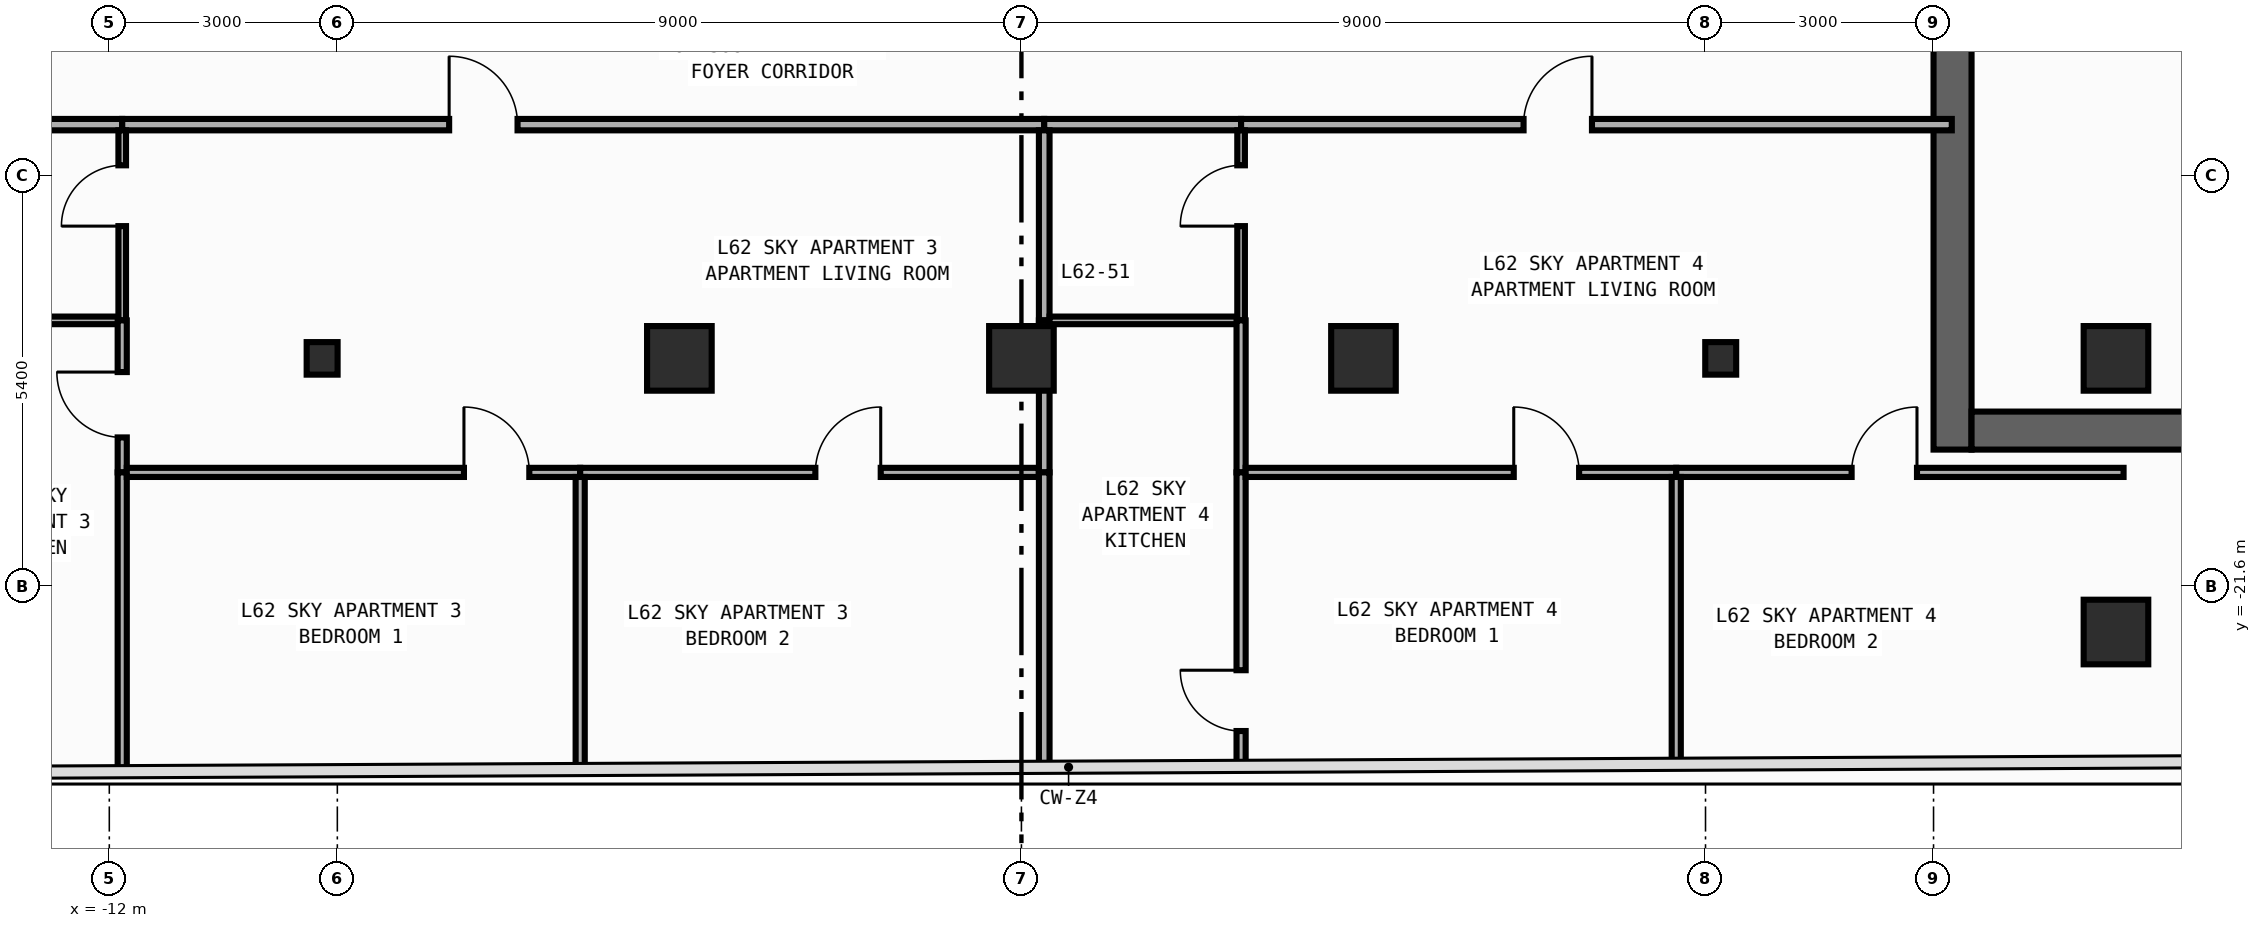
"""IFC4 building model, lengths in metres.
Left out: names, types, materials, properties, quantities, classifications, styles, units other than length and angle.
Written with IfcOpenShell. Run it as: python <this file> out.ifc"""

import sys

from ifc_helpers import new_model, si_unit, direction, frame, frame_2d, origin, origin_2d, place, context, subcontext, project, spatial, rectangle, i_section, extrude, element, fill, save


model = new_model("IFC4")
c1 = context("Model", 3, precision=1e-05, world=origin(), true_north=direction((0.0, 1.0)))
c2 = subcontext(c1, "Body", "Model", "MODEL_VIEW")
j1 = project(units=[si_unit("LENGTHUNIT", "METRE"), si_unit("PLANEANGLEUNIT", "RADIAN")], contexts=[c1])
p1 = place(None, origin())
s1 = spatial("IfcSite", under=j1, at=p1, CompositionType="ELEMENT")
p2 = place(p1, origin())
s2 = spatial("IfcBuilding", under=s1, at=p2, CompositionType="ELEMENT")
p3 = place(p2, frame((0.0, 0.0, 262.0)))
s3 = spatial("IfcBuildingStorey", under=s2, at=p3, CompositionType="ELEMENT", Elevation=262.0)
p4 = place(p3, frame((12.25, -19.8, 0.0), z_axis=(0.0, 0.0, 1.0), x_axis=(0.0, 1.0, 0.0)))
e1 = element("IfcWall", 1, at=p4, inside=s3, PredefinedType="SHEAR", context=c2, shape_type="SweptSolid", body=[
    extrude(rectangle(XDim=27.0, YDim=0.5, at=frame_2d((13.5, 0.0))), origin(), (0.0, 0.0, 1.0), 3.34),
])
p5 = place(p4, frame((23.05, 0.0, 0.0)))
e2 = element("IfcOpeningElement", 2, at=p5, cuts=e1, PredefinedType="OPENING", context=c2, shape_type="SweptSolid", body=[
    extrude(rectangle(XDim=1.1, YDim=2.2, at=frame_2d((0.55, 1.1))), frame((0.0, 0.26, 0.0), z_axis=(0.0, -1.0, 0.0), x_axis=(1.0, 0.0, 0.0)), (0.0, 0.0, 1.0), 0.52),
])
p6 = place(p4, frame((19.85, 0.0, 0.0)))
e3 = element("IfcOpeningElement", 3, at=p6, cuts=e1, PredefinedType="OPENING", context=c2, shape_type="SweptSolid", body=[
    extrude(rectangle(XDim=1.1, YDim=2.2, at=frame_2d((0.55, 1.1))), frame((0.0, 0.26, 0.0), z_axis=(0.0, -1.0, 0.0), x_axis=(1.0, 0.0, 0.0)), (0.0, 0.0, 1.0), 0.52),
])
p7 = place(p4, frame((16.65, 0.0, 0.0)))
e4 = element("IfcOpeningElement", 4, at=p7, cuts=e1, PredefinedType="OPENING", context=c2, shape_type="SweptSolid", body=[
    extrude(rectangle(XDim=1.1, YDim=2.2, at=frame_2d((0.55, 1.1))), frame((0.0, 0.26, 0.0), z_axis=(0.0, -1.0, 0.0), x_axis=(1.0, 0.0, 0.0)), (0.0, 0.0, 1.0), 0.52),
])
p8 = place(p4, frame((6.275, 0.0, 0.0)))
e5 = element("IfcOpeningElement", 5, at=p8, cuts=e1, PredefinedType="OPENING", context=c2, shape_type="SweptSolid", body=[
    extrude(rectangle(XDim=0.85, YDim=2.1, at=frame_2d((0.425, 1.05))), frame((0.0, 0.26, 0.0), z_axis=(0.0, -1.0, 0.0), x_axis=(1.0, 0.0, 0.0)), (0.0, 0.0, 1.0), 0.52),
])
p9 = place(p4, frame((8.575, 0.0, 0.0)))
e6 = element("IfcOpeningElement", 6, at=p9, cuts=e1, PredefinedType="OPENING", context=c2, shape_type="SweptSolid", body=[
    extrude(rectangle(XDim=0.85, YDim=2.1, at=frame_2d((0.425, 1.05))), frame((0.0, 0.26, 0.0), z_axis=(0.0, -1.0, 0.0), x_axis=(1.0, 0.0, 0.0)), (0.0, 0.0, 1.0), 0.52),
])
p10 = place(p4, frame((10.675, 0.0, 0.0)))
e7 = element("IfcOpeningElement", 7, at=p10, cuts=e1, PredefinedType="OPENING", context=c2, shape_type="SweptSolid", body=[
    extrude(rectangle(XDim=0.85, YDim=2.1, at=frame_2d((0.425, 1.05))), frame((0.0, 0.26, 0.0), z_axis=(0.0, -1.0, 0.0), x_axis=(1.0, 0.0, 0.0)), (0.0, 0.0, 1.0), 0.52),
])
p11 = place(p4, frame((12.725, 0.0, 0.0)))
e8 = element("IfcOpeningElement", 8, at=p11, cuts=e1, PredefinedType="OPENING", context=c2, shape_type="SweptSolid", body=[
    extrude(rectangle(XDim=1.15, YDim=2.2, at=frame_2d((0.575, 1.1))), frame((0.0, 0.26, 0.0), z_axis=(0.0, -1.0, 0.0), x_axis=(1.0, 0.0, 0.0)), (0.0, 0.0, 1.0), 0.52),
])
p12 = place(p4, frame((25.125, 0.0, 0.0)))
e9 = element("IfcOpeningElement", 9, at=p12, cuts=e1, PredefinedType="OPENING", context=c2, shape_type="SweptSolid", body=[
    extrude(rectangle(XDim=0.85, YDim=2.1, at=frame_2d((0.425, 1.05))), frame((0.0, 0.26, 0.0), z_axis=(0.0, -1.0, 0.0), x_axis=(1.0, 0.0, 0.0)), (0.0, 0.0, 1.0), 0.52),
])
p13 = place(p3, frame((12.5, -19.55, 0.0), z_axis=(0.0, 0.0, 1.0), x_axis=(1.0, 0.0, 0.0)))
e10 = element("IfcWall", 10, at=p13, inside=s3, PredefinedType="SHEAR", context=c2, shape_type="SweptSolid", body=[
    extrude(rectangle(XDim=7.4, YDim=0.5, at=frame_2d((3.7, 0.0))), origin(), (0.0, 0.0, 1.0), 3.34),
])
for number, where, z_axis, x_axis in (
    (11, (-9.2, -18.6, 0.0), (0.0, 0.0, 1.0), (1.0, 0.0, 0.0)),
    (12, (9.2, -18.6, 0.0), (0.0, 0.0, 1.0), (1.0, 0.0, 0.0)),
):
    element("IfcColumn", number, at=place(p3, frame(where, z_axis=z_axis, x_axis=x_axis)), inside=s3, PredefinedType="COLUMN", context=c2, shape_type="SweptSolid", body=[
        extrude(i_section(OverallWidth=0.407, OverallDepth=0.428, WebThickness=0.02, FlangeThickness=0.035, FilletRadius=0.022, at=origin_2d()), origin(), (0.0, 0.0, 1.0), 3.6),
    ])
for number, where, z_axis, x_axis in (
    (13, (14.4, -18.6, 0.0), (0.0, 0.0, 1.0), (1.0, 0.0, 0.0)),
    (14, (-4.5, -18.6, 0.0), (0.0, 0.0, 1.0), (1.0, 0.0, 0.0)),
    (15, (0.0, -18.6, 0.0), (0.0, 0.0, 1.0), (1.0, 0.0, 0.0)),
    (16, (4.5, -18.6, 0.0), (0.0, 0.0, 1.0), (1.0, 0.0, 0.0)),
    (17, (14.4, -22.2, 0.0), (0.0, 0.0, 1.0), (1.0, 0.0, 0.0)),
):
    element("IfcColumn", number, at=place(p3, frame(where, z_axis=z_axis, x_axis=x_axis)), inside=s3, PredefinedType="COLUMN", context=c2, shape_type="SweptSolid", body=[
        extrude(rectangle(XDim=0.85, YDim=0.85, at=origin_2d()), origin(), (0.0, 0.0, 1.0), 3.6),
    ])
p14 = place(p3, frame((-14.37, -15.525, 0.0), z_axis=(0.0, 0.0, 1.0), x_axis=(1.0, 0.0, 0.0)))
e18 = element("IfcWall", 18, at=p14, inside=s3, PredefinedType="PARTITIONING", context=c2, shape_type="SweptSolid", body=[
    extrude(rectangle(XDim=2.54, YDim=0.15, at=frame_2d((1.27, 0.0))), origin(), (0.0, 0.0, 1.0), 3.34),
])
p15 = place(p3, frame((-11.83, -15.525, 0.0), z_axis=(0.0, 0.0, 1.0), x_axis=(1.0, 0.0, 0.0)))
e19 = element("IfcWall", 19, at=p15, inside=s3, PredefinedType="PARTITIONING", context=c2, shape_type="SweptSolid", body=[
    extrude(rectangle(XDim=12.13, YDim=0.15, at=frame_2d((6.065, 0.0))), origin(), (0.0, 0.0, 1.0), 3.34),
])
p16 = place(p15, frame((4.301, 0.0, 0.0)))
e20 = element("IfcOpeningElement", 20, at=p16, cuts=e19, PredefinedType="OPENING", context=c2, shape_type="SweptSolid", body=[
    extrude(rectangle(XDim=0.9, YDim=2.15, at=frame_2d((0.45, 1.075))), frame((0.0, 0.085, 0.0), z_axis=(0.0, -1.0, 0.0), x_axis=(1.0, 0.0, 0.0)), (0.0, 0.0, 1.0), 0.17),
])
p17 = place(p3, frame((0.3, -15.525, 0.0), z_axis=(0.0, 0.0, 1.0), x_axis=(1.0, 0.0, 0.0)))
e21 = element("IfcWall", 21, at=p17, inside=s3, PredefinedType="PARTITIONING", context=c2, shape_type="SweptSolid", body=[
    extrude(rectangle(XDim=2.59, YDim=0.15, at=frame_2d((1.295, 0.0))), origin(), (0.0, 0.0, 1.0), 3.34),
])
p18 = place(p3, frame((2.89, -15.525, 0.0), z_axis=(0.0, 0.0, 1.0), x_axis=(1.0, 0.0, 0.0)))
e22 = element("IfcWall", 22, at=p18, inside=s3, PredefinedType="PARTITIONING", context=c2, shape_type="SweptSolid", body=[
    extrude(rectangle(XDim=9.35, YDim=0.15, at=frame_2d((4.675, 0.0))), origin(), (0.0, 0.0, 1.0), 3.34),
])
p19 = place(p18, frame((3.716, 0.0, 0.0)))
e23 = element("IfcOpeningElement", 23, at=p19, cuts=e22, PredefinedType="OPENING", context=c2, shape_type="SweptSolid", body=[
    extrude(rectangle(XDim=0.9, YDim=2.15, at=frame_2d((0.45, 1.075))), frame((0.0, 0.085, 0.0), z_axis=(0.0, -1.0, 0.0), x_axis=(1.0, 0.0, 0.0)), (0.0, 0.0, 1.0), 0.17),
])
p20 = place(p3, frame((-14.3, -18.1, 0.0), z_axis=(0.0, 0.0, 1.0), x_axis=(1.0, 0.0, 0.0)))
e24 = element("IfcWall", 24, at=p20, inside=s3, PredefinedType="PARTITIONING", context=c2, shape_type="SweptSolid", body=[
    extrude(rectangle(XDim=2.42, YDim=0.1, at=frame_2d((1.21, 0.0))), origin(), (0.0, 0.0, 1.0), 3.34),
])
p21 = place(p3, frame((-11.83, -18.1, 0.0), z_axis=(0.0, 0.0, 1.0), x_axis=(0.0, 1.0, 0.0)))
e25 = element("IfcWall", 25, at=p21, inside=s3, PredefinedType="PARTITIONING", context=c2, shape_type="SweptSolid", body=[
    extrude(rectangle(XDim=2.5, YDim=0.1, at=frame_2d((1.25, 0.0))), origin(), (0.0, 0.0, 1.0), 3.34),
])
p22 = place(p21, frame((1.24, 0.0, 0.0)))
e26 = element("IfcOpeningElement", 26, at=p22, cuts=e25, PredefinedType="OPENING", context=c2, shape_type="SweptSolid", body=[
    extrude(rectangle(XDim=0.8, YDim=2.1, at=frame_2d((0.4, 1.05))), frame((0.0, 0.06, 0.0), z_axis=(0.0, -1.0, 0.0), x_axis=(1.0, 0.0, 0.0)), (0.0, 0.0, 1.0), 0.12),
])
p23 = place(p3, frame((-11.83, -20.1, 0.0), z_axis=(0.0, 0.0, 1.0), x_axis=(0.0, 1.0, 0.0)))
e27 = element("IfcWall", 27, at=p23, inside=s3, PredefinedType="PARTITIONING", context=c2, shape_type="SweptSolid", body=[
    extrude(rectangle(XDim=2.0, YDim=0.12, at=frame_2d((1.0, 0.0))), origin(), (0.0, 0.0, 1.0), 3.34),
])
p24 = place(p23, frame((0.46, 0.0, 0.0)))
e28 = element("IfcOpeningElement", 28, at=p24, cuts=e27, PredefinedType="OPENING", context=c2, shape_type="SweptSolid", body=[
    extrude(rectangle(XDim=0.86, YDim=2.15, at=frame_2d((0.43, 1.075))), frame((0.0, 0.07, 0.0), z_axis=(0.0, -1.0, 0.0), x_axis=(1.0, 0.0, 0.0)), (0.0, 0.0, 1.0), 0.14),
])
p25 = place(p3, frame((-11.83, -24.033, 0.0), z_axis=(0.0, 0.0, 1.0), x_axis=(0.0, 1.0, 0.0)))
e29 = element("IfcWall", 29, at=p25, inside=s3, PredefinedType="PARTITIONING", context=c2, shape_type="SweptSolid", body=[
    extrude(rectangle(XDim=3.933, YDim=0.12, at=frame_2d((1.966, 0.0))), origin(), (0.0, 0.0, 1.0), 3.34),
])
p26 = place(p3, frame((-11.77, -20.1, 0.0), z_axis=(0.0, 0.0, 1.0), x_axis=(1.0, 0.0, 0.0)))
e30 = element("IfcWall", 30, at=p26, inside=s3, PredefinedType="PARTITIONING", context=c2, shape_type="SweptSolid", body=[
    extrude(rectangle(XDim=5.965, YDim=0.12, at=frame_2d((2.982, 0.0))), origin(), (0.0, 0.0, 1.0), 3.34),
])
p27 = place(p26, frame((4.436, 0.0, 0.0)))
e31 = element("IfcOpeningElement", 31, at=p27, cuts=e30, PredefinedType="OPENING", context=c2, shape_type="SweptSolid", body=[
    extrude(rectangle(XDim=0.86, YDim=2.15, at=frame_2d((0.43, 1.075))), frame((0.0, 0.07, 0.0), z_axis=(0.0, -1.0, 0.0), x_axis=(1.0, 0.0, 0.0)), (0.0, 0.0, 1.0), 0.14),
])
p28 = place(p3, frame((-5.805, -20.1, 0.0), z_axis=(0.0, 0.0, 1.0), x_axis=(1.0, 0.0, 0.0)))
e32 = element("IfcWall", 32, at=p28, inside=s3, PredefinedType="PARTITIONING", context=c2, shape_type="SweptSolid", body=[
    extrude(rectangle(XDim=6.035, YDim=0.12, at=frame_2d((3.018, 0.0))), origin(), (0.0, 0.0, 1.0), 3.34),
])
p29 = place(p28, frame((3.094, 0.0, 0.0)))
e33 = element("IfcOpeningElement", 33, at=p29, cuts=e32, PredefinedType="OPENING", context=c2, shape_type="SweptSolid", body=[
    extrude(rectangle(XDim=0.86, YDim=2.15, at=frame_2d((0.43, 1.075))), frame((0.0, 0.07, 0.0), z_axis=(0.0, -1.0, 0.0), x_axis=(1.0, 0.0, 0.0)), (0.0, 0.0, 1.0), 0.14),
])
p30 = place(p3, frame((0.3, -18.1, 0.0), z_axis=(0.0, 0.0, 1.0), x_axis=(0.0, 1.0, 0.0)))
e34 = element("IfcWall", 34, at=p30, inside=s3, PredefinedType="PARTITIONING", context=c2, shape_type="SweptSolid", body=[
    extrude(rectangle(XDim=2.5, YDim=0.14, at=frame_2d((1.25, 0.0))), origin(), (0.0, 0.0, 1.0), 3.34),
])
p31 = place(p3, frame((0.3, -20.1, 0.0), z_axis=(0.0, 0.0, 1.0), x_axis=(0.0, 1.0, 0.0)))
e35 = element("IfcWall", 35, at=p31, inside=s3, PredefinedType="PARTITIONING", context=c2, shape_type="SweptSolid", body=[
    extrude(rectangle(XDim=2.0, YDim=0.14, at=frame_2d((1.0, 0.0))), origin(), (0.0, 0.0, 1.0), 3.34),
])
p32 = place(p3, frame((-5.805, -24.004, 0.0), z_axis=(0.0, 0.0, 1.0), x_axis=(0.0, 1.0, 0.0)))
e36 = element("IfcWall", 36, at=p32, inside=s3, PredefinedType="PARTITIONING", context=c2, shape_type="SweptSolid", body=[
    extrude(rectangle(XDim=3.844, YDim=0.12, at=frame_2d((1.922, 0.0))), origin(), (0.0, 0.0, 1.0), 3.34),
])
p33 = place(p3, frame((0.3, -23.975, 0.0), z_axis=(0.0, 0.0, 1.0), x_axis=(0.0, 1.0, 0.0)))
e37 = element("IfcWall", 37, at=p33, inside=s3, PredefinedType="PARTITIONING", context=c2, shape_type="SweptSolid", body=[
    extrude(rectangle(XDim=3.875, YDim=0.14, at=frame_2d((1.938, 0.0))), origin(), (0.0, 0.0, 1.0), 3.34),
])
p34 = place(p3, frame((0.37, -18.1, 0.0), z_axis=(0.0, 0.0, 1.0), x_axis=(1.0, 0.0, 0.0)))
e38 = element("IfcWall", 38, at=p34, inside=s3, PredefinedType="PARTITIONING", context=c2, shape_type="SweptSolid", body=[
    extrude(rectangle(XDim=2.47, YDim=0.1, at=frame_2d((1.235, 0.0))), origin(), (0.0, 0.0, 1.0), 3.34),
])
p35 = place(p3, frame((2.89, -18.1, 0.0), z_axis=(0.0, 0.0, 1.0), x_axis=(0.0, 1.0, 0.0)))
e39 = element("IfcWall", 39, at=p35, inside=s3, PredefinedType="PARTITIONING", context=c2, shape_type="SweptSolid", body=[
    extrude(rectangle(XDim=2.5, YDim=0.1, at=frame_2d((1.25, 0.0))), origin(), (0.0, 0.0, 1.0), 3.34),
])
p36 = place(p35, frame((1.24, 0.0, 0.0)))
e40 = element("IfcOpeningElement", 40, at=p36, cuts=e39, PredefinedType="OPENING", context=c2, shape_type="SweptSolid", body=[
    extrude(rectangle(XDim=0.8, YDim=2.1, at=frame_2d((0.4, 1.05))), frame((0.0, 0.06, 0.0), z_axis=(0.0, -1.0, 0.0), x_axis=(1.0, 0.0, 0.0)), (0.0, 0.0, 1.0), 0.12),
])
p37 = place(p3, frame((2.89, -20.1, 0.0), z_axis=(0.0, 0.0, 1.0), x_axis=(0.0, 1.0, 0.0)))
e41 = element("IfcWall", 41, at=p37, inside=s3, PredefinedType="PARTITIONING", context=c2, shape_type="SweptSolid", body=[
    extrude(rectangle(XDim=2.0, YDim=0.12, at=frame_2d((1.0, 0.0))), origin(), (0.0, 0.0, 1.0), 3.34),
])
p38 = place(p3, frame((2.89, -23.962, 0.0), z_axis=(0.0, 0.0, 1.0), x_axis=(0.0, 1.0, 0.0)))
e42 = element("IfcWall", 42, at=p38, inside=s3, PredefinedType="PARTITIONING", context=c2, shape_type="SweptSolid", body=[
    extrude(rectangle(XDim=3.862, YDim=0.12, at=frame_2d((1.931, 0.0))), origin(), (0.0, 0.0, 1.0), 3.34),
])
p39 = place(p38, frame((0.46, 0.0, 0.0)))
e43 = element("IfcOpeningElement", 43, at=p39, cuts=e42, PredefinedType="OPENING", context=c2, shape_type="SweptSolid", body=[
    extrude(rectangle(XDim=0.8, YDim=2.1, at=frame_2d((0.4, 1.05))), frame((0.0, 0.07, 0.0), z_axis=(0.0, -1.0, 0.0), x_axis=(1.0, 0.0, 0.0)), (0.0, 0.0, 1.0), 0.14),
])
p40 = place(p3, frame((2.95, -20.1, 0.0), z_axis=(0.0, 0.0, 1.0), x_axis=(1.0, 0.0, 0.0)))
e44 = element("IfcWall", 44, at=p40, inside=s3, PredefinedType="PARTITIONING", context=c2, shape_type="SweptSolid", body=[
    extrude(rectangle(XDim=5.665, YDim=0.12, at=frame_2d((2.833, 0.0))), origin(), (0.0, 0.0, 1.0), 3.34),
])
p41 = place(p40, frame((3.527, 0.0, 0.0)))
e45 = element("IfcOpeningElement", 45, at=p41, cuts=e44, PredefinedType="OPENING", context=c2, shape_type="SweptSolid", body=[
    extrude(rectangle(XDim=0.86, YDim=2.15, at=frame_2d((0.43, 1.075))), frame((0.0, 0.07, 0.0), z_axis=(0.0, -1.0, 0.0), x_axis=(1.0, 0.0, 0.0)), (0.0, 0.0, 1.0), 0.14),
])
p42 = place(p3, frame((8.615, -20.1, 0.0), z_axis=(0.0, 0.0, 1.0), x_axis=(1.0, 0.0, 0.0)))
e46 = element("IfcWall", 46, at=p42, inside=s3, PredefinedType="PARTITIONING", context=c2, shape_type="SweptSolid", body=[
    extrude(rectangle(XDim=5.885, YDim=0.12, at=frame_2d((2.942, 0.0))), origin(), (0.0, 0.0, 1.0), 3.34),
])
p43 = place(p42, frame((2.307, 0.0, 0.0)))
e47 = element("IfcOpeningElement", 47, at=p43, cuts=e46, PredefinedType="OPENING", context=c2, shape_type="SweptSolid", body=[
    extrude(rectangle(XDim=0.86, YDim=2.15, at=frame_2d((0.43, 1.075))), frame((0.0, 0.07, 0.0), z_axis=(0.0, -1.0, 0.0), x_axis=(1.0, 0.0, 0.0)), (0.0, 0.0, 1.0), 0.14),
])
p44 = place(p3, frame((8.615, -23.935, 0.0), z_axis=(0.0, 0.0, 1.0), x_axis=(0.0, 1.0, 0.0)))
e48 = element("IfcWall", 48, at=p44, inside=s3, PredefinedType="PARTITIONING", context=c2, shape_type="SweptSolid", body=[
    extrude(rectangle(XDim=3.775, YDim=0.12, at=frame_2d((1.888, 0.0))), origin(), (0.0, 0.0, 1.0), 3.34),
])
p45 = place(p16, origin())
e49 = element("IfcDoor", 49, at=p45, inside=s3, OperationType="SINGLE_SWING_LEFT", PredefinedType="DOOR", context=c2, shape_type="SweptSolid", body=[
    extrude(rectangle(XDim=0.9, YDim=2.15, at=frame_2d((0.45, 1.075))), frame((0.0, 0.025, 0.0), z_axis=(0.0, -1.0, 0.0), x_axis=(1.0, 0.0, 0.0)), (0.0, 0.0, 1.0), 0.05),
])
fill(e20, e49)
p46 = place(p19, origin())
e50 = element("IfcDoor", 50, at=p46, inside=s3, OperationType="SINGLE_SWING_RIGHT", PredefinedType="DOOR", context=c2, shape_type="SweptSolid", body=[
    extrude(rectangle(XDim=0.9, YDim=2.15, at=frame_2d((0.45, 1.075))), frame((0.0, 0.025, 0.0), z_axis=(0.0, -1.0, 0.0), x_axis=(1.0, 0.0, 0.0)), (0.0, 0.0, 1.0), 0.05),
])
fill(e23, e50)
p47 = place(p22, origin())
e51 = element("IfcDoor", 51, at=p47, inside=s3, OperationType="SINGLE_SWING_LEFT", PredefinedType="DOOR", context=c2, shape_type="SweptSolid", body=[
    extrude(rectangle(XDim=0.8, YDim=2.1, at=frame_2d((0.4, 1.05))), frame((0.0, 0.025, 0.0), z_axis=(0.0, -1.0, 0.0), x_axis=(1.0, 0.0, 0.0)), (0.0, 0.0, 1.0), 0.05),
])
fill(e26, e51)
p48 = place(p24, origin())
e52 = element("IfcDoor", 52, at=p48, inside=s3, OperationType="SINGLE_SWING_RIGHT", PredefinedType="DOOR", context=c2, shape_type="SweptSolid", body=[
    extrude(rectangle(XDim=0.86, YDim=2.15, at=frame_2d((0.43, 1.075))), frame((0.0, 0.025, 0.0), z_axis=(0.0, -1.0, 0.0), x_axis=(1.0, 0.0, 0.0)), (0.0, 0.0, 1.0), 0.05),
])
fill(e28, e52)
p49 = place(p27, origin())
e53 = element("IfcDoor", 53, at=p49, inside=s3, OperationType="SINGLE_SWING_LEFT", PredefinedType="DOOR", context=c2, shape_type="SweptSolid", body=[
    extrude(rectangle(XDim=0.86, YDim=2.15, at=frame_2d((0.43, 1.075))), frame((0.0, 0.025, 0.0), z_axis=(0.0, -1.0, 0.0), x_axis=(1.0, 0.0, 0.0)), (0.0, 0.0, 1.0), 0.05),
])
fill(e31, e53)
p50 = place(p29, origin())
e54 = element("IfcDoor", 54, at=p50, inside=s3, OperationType="SINGLE_SWING_RIGHT", PredefinedType="DOOR", context=c2, shape_type="SweptSolid", body=[
    extrude(rectangle(XDim=0.86, YDim=2.15, at=frame_2d((0.43, 1.075))), frame((0.0, 0.025, 0.0), z_axis=(0.0, -1.0, 0.0), x_axis=(1.0, 0.0, 0.0)), (0.0, 0.0, 1.0), 0.05),
])
fill(e33, e54)
p51 = place(p36, origin())
e55 = element("IfcDoor", 55, at=p51, inside=s3, OperationType="SINGLE_SWING_LEFT", PredefinedType="DOOR", context=c2, shape_type="SweptSolid", body=[
    extrude(rectangle(XDim=0.8, YDim=2.1, at=frame_2d((0.4, 1.05))), frame((0.0, 0.025, 0.0), z_axis=(0.0, -1.0, 0.0), x_axis=(1.0, 0.0, 0.0)), (0.0, 0.0, 1.0), 0.05),
])
fill(e40, e55)
p52 = place(p41, origin())
e56 = element("IfcDoor", 56, at=p52, inside=s3, OperationType="SINGLE_SWING_LEFT", PredefinedType="DOOR", context=c2, shape_type="SweptSolid", body=[
    extrude(rectangle(XDim=0.86, YDim=2.15, at=frame_2d((0.43, 1.075))), frame((0.0, 0.025, 0.0), z_axis=(0.0, -1.0, 0.0), x_axis=(1.0, 0.0, 0.0)), (0.0, 0.0, 1.0), 0.05),
])
fill(e45, e56)
p53 = place(p43, origin())
e57 = element("IfcDoor", 57, at=p53, inside=s3, OperationType="SINGLE_SWING_RIGHT", PredefinedType="DOOR", context=c2, shape_type="SweptSolid", body=[
    extrude(rectangle(XDim=0.86, YDim=2.15, at=frame_2d((0.43, 1.075))), frame((0.0, 0.025, 0.0), z_axis=(0.0, -1.0, 0.0), x_axis=(1.0, 0.0, 0.0)), (0.0, 0.0, 1.0), 0.05),
])
fill(e47, e57)
p54 = place(p39, origin())
e58 = element("IfcDoor", 58, at=p54, inside=s3, OperationType="SINGLE_SWING_RIGHT", PredefinedType="DOOR", context=c2, shape_type="SweptSolid", body=[
    extrude(rectangle(XDim=0.8, YDim=2.1, at=frame_2d((0.4, 1.05))), frame((0.0, 0.025, 0.0), z_axis=(0.0, -1.0, 0.0), x_axis=(1.0, 0.0, 0.0)), (0.0, 0.0, 1.0), 0.05),
])
fill(e43, e58)
save(model, sys.argv[1])
